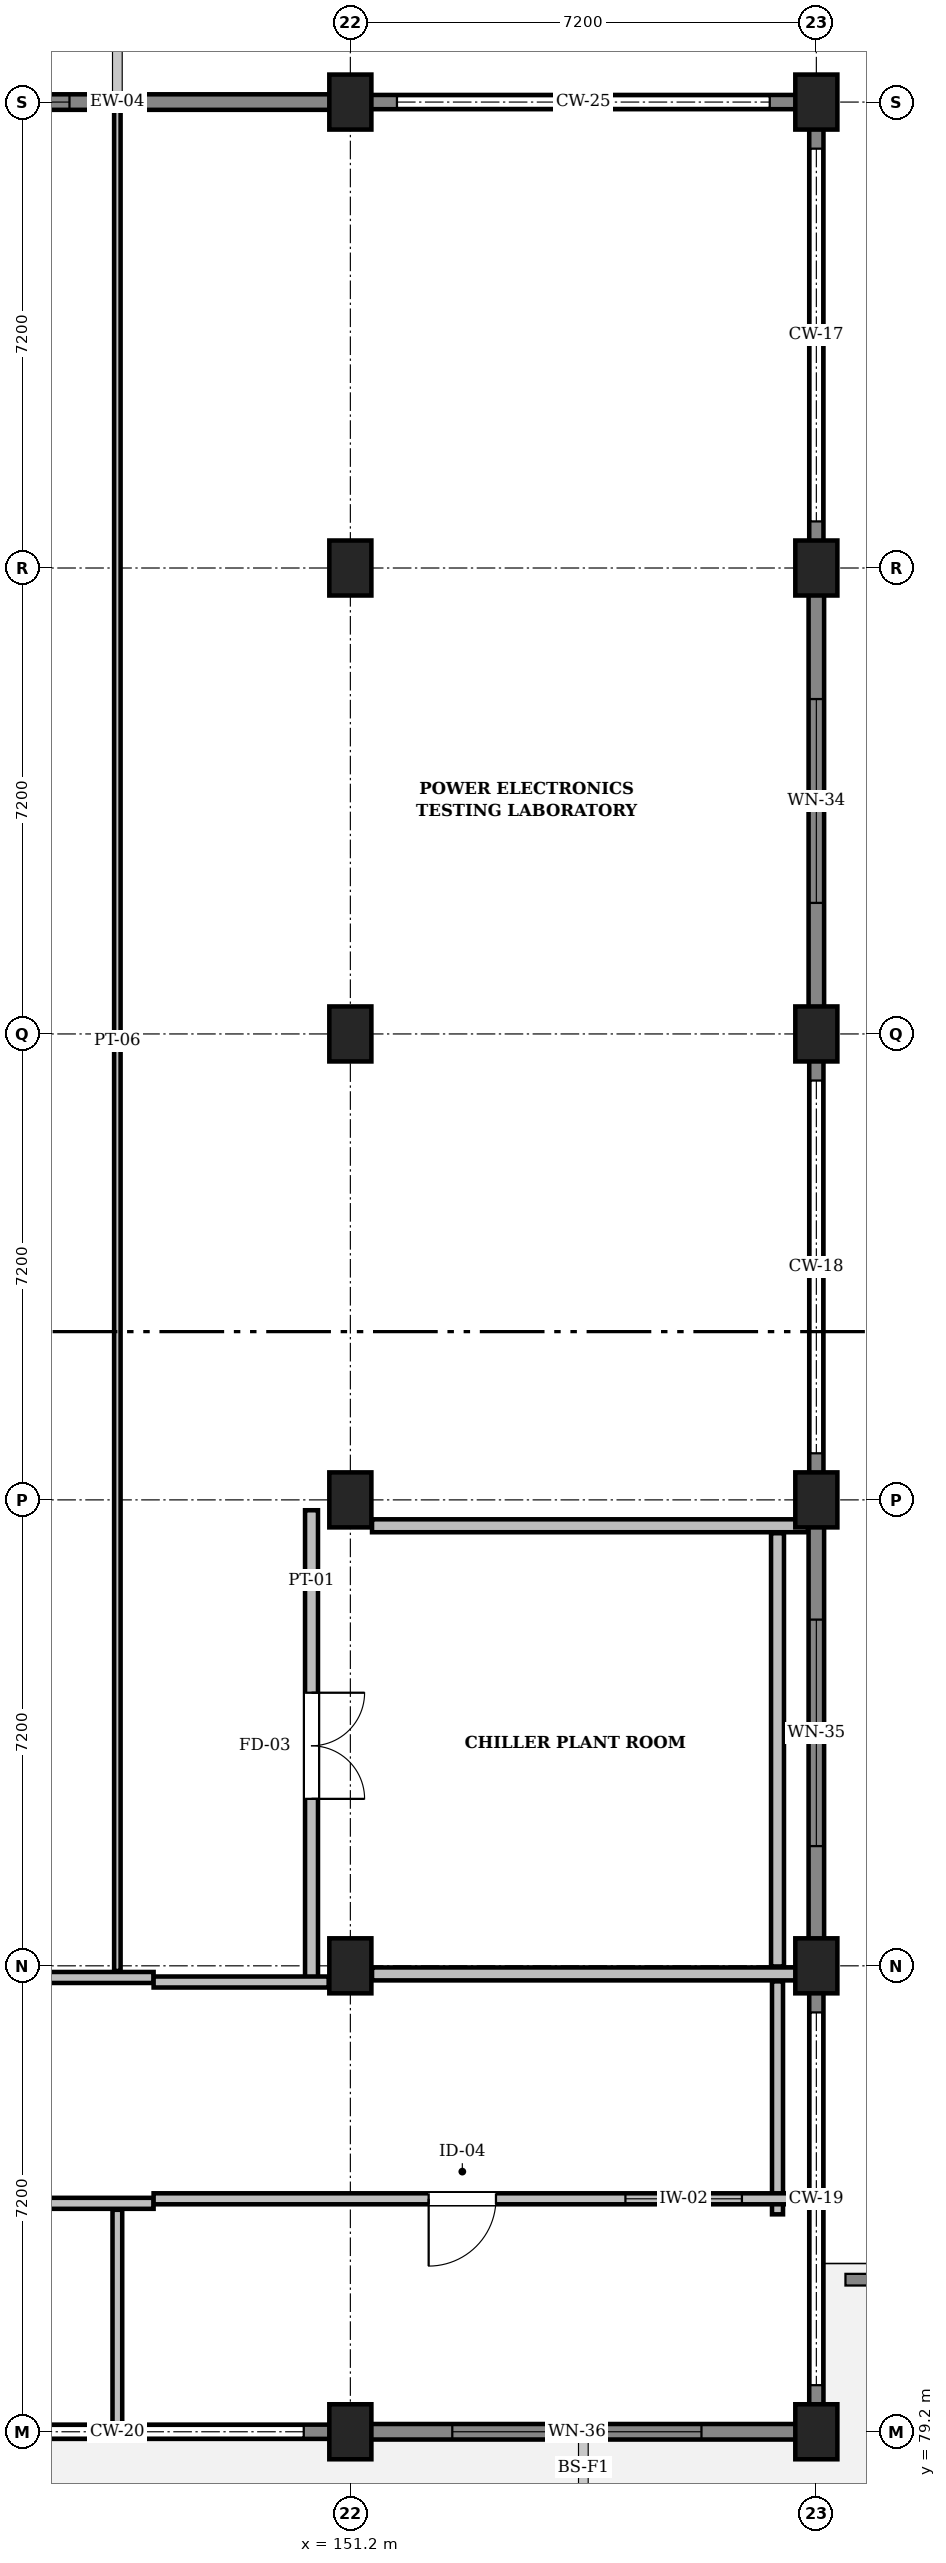
"""IFC4 building model, lengths in metres.
Left out: names, types, materials, properties, quantities, classifications, styles, units other than length and angle.
Written with IfcOpenShell. Run it as: python <this file> out.ifc"""

import sys

from ifc_helpers import new_model, si_unit, direction, frame, frame_2d, origin, origin_2d, place, context, subcontext, project, spatial, rectangle, extrude, element, fill, save


model = new_model("IFC4")
c1 = context("Model", 3, precision=1e-05, world=origin(), true_north=direction((0.0, 1.0)))
c2 = subcontext(c1, "Body", "Model", "MODEL_VIEW")
j1 = project(units=[si_unit("LENGTHUNIT", "METRE"), si_unit("PLANEANGLEUNIT", "RADIAN")], contexts=[c1])
p1 = place(None, origin())
s1 = spatial("IfcSite", under=j1, at=p1, CompositionType="ELEMENT")
p2 = place(p1, origin())
s2 = spatial("IfcBuilding", under=s1, at=p2, CompositionType="ELEMENT")
p3 = place(p2, frame((0.0, 0.0, 9.6)))
s3 = spatial("IfcBuildingStorey", under=s2, at=p3, CompositionType="ELEMENT", Elevation=9.6)
for number, where, z_axis, x_axis in (
    (1, (151.2, 79.2, 0.0), (0.0, 0.0, 1.0), (1.0, 0.0, 0.0)),
    (2, (151.2, 86.4, 0.0), (0.0, 0.0, 1.0), (1.0, 0.0, 0.0)),
    (3, (151.2, 93.6, 0.0), (0.0, 0.0, 1.0), (1.0, 0.0, 0.0)),
    (4, (151.2, 100.8, 0.0), (0.0, 0.0, 1.0), (1.0, 0.0, 0.0)),
    (5, (151.2, 108.0, 0.0), (0.0, 0.0, 1.0), (1.0, 0.0, 0.0)),
    (6, (151.2, 115.2, 0.0), (0.0, 0.0, 1.0), (1.0, 0.0, 0.0)),
    (7, (158.4, 79.2, 0.0), (0.0, 0.0, 1.0), (1.0, 0.0, 0.0)),
    (8, (158.4, 86.4, 0.0), (0.0, 0.0, 1.0), (1.0, 0.0, 0.0)),
    (9, (158.4, 93.6, 0.0), (0.0, 0.0, 1.0), (1.0, 0.0, 0.0)),
    (10, (158.4, 100.8, 0.0), (0.0, 0.0, 1.0), (1.0, 0.0, 0.0)),
    (11, (158.4, 108.0, 0.0), (0.0, 0.0, 1.0), (1.0, 0.0, 0.0)),
    (12, (158.4, 115.2, 0.0), (0.0, 0.0, 1.0), (1.0, 0.0, 0.0)),
):
    element("IfcColumn", number, at=place(p3, frame(where, z_axis=z_axis, x_axis=x_axis)), inside=s3, PredefinedType="COLUMN", context=c2, shape_type="SweptSolid", body=[
        extrude(rectangle(XDim=0.65, YDim=0.85, at=origin_2d()), origin(), (0.0, 0.0, 1.0), 4.8),
    ])
p4 = place(p3, frame((158.4, 115.048, 0.0), z_axis=(0.0, 0.0, 1.0), x_axis=(0.0, -1.0, 0.0)))
e13 = element("IfcWall", 13, at=p4, inside=s3, PredefinedType="SOLIDWALL", context=c2, shape_type="SweptSolid", body=[
    extrude(rectangle(XDim=7.048, YDim=0.22, at=frame_2d((3.524, 0.0))), origin(), (0.0, 0.0, 1.0), 1.24),
])
p5 = place(p3, frame((158.4, 108.0, 0.0), z_axis=(0.0, 0.0, 1.0), x_axis=(0.0, -1.0, 0.0)))
e14 = element("IfcWall", 14, at=p5, inside=s3, PredefinedType="SOLIDWALL", context=c2, shape_type="SweptSolid", body=[
    extrude(rectangle(XDim=7.2, YDim=0.24, at=frame_2d((3.6, 0.0))), origin(), (0.0, 0.0, 1.0), 4.52),
])
p6 = place(p5, frame((2.025, 0.0, 0.95)))
e15 = element("IfcOpeningElement", 15, at=p6, cuts=e14, PredefinedType="OPENING", context=c2, shape_type="SweptSolid", body=[
    extrude(rectangle(XDim=3.15, YDim=1.8, at=frame_2d((1.575, 0.9))), frame((0.0, 0.132, 0.0), z_axis=(0.0, -1.0, 0.0), x_axis=(1.0, 0.0, 0.0)), (0.0, 0.0, 1.0), 0.264),
])
p7 = place(p3, frame((158.4, 100.8, 0.0), z_axis=(0.0, 0.0, 1.0), x_axis=(0.0, -1.0, 0.0)))
e16 = element("IfcWall", 16, at=p7, inside=s3, PredefinedType="SOLIDWALL", context=c2, shape_type="SweptSolid", body=[
    extrude(rectangle(XDim=7.2, YDim=0.22, at=frame_2d((3.6, 0.0))), origin(), (0.0, 0.0, 1.0), 1.24),
])
p8 = place(p3, frame((158.4, 93.6, 0.0), z_axis=(0.0, 0.0, 1.0), x_axis=(0.0, -1.0, 0.0)))
e17 = element("IfcWall", 17, at=p8, inside=s3, PredefinedType="SOLIDWALL", context=c2, shape_type="SweptSolid", body=[
    extrude(rectangle(XDim=7.2, YDim=0.24, at=frame_2d((3.6, 0.0))), origin(), (0.0, 0.0, 1.0), 4.52),
])
p9 = place(p8, frame((1.85, 0.0, 0.95)))
e18 = element("IfcOpeningElement", 18, at=p9, cuts=e17, PredefinedType="OPENING", context=c2, shape_type="SweptSolid", body=[
    extrude(rectangle(XDim=3.5, YDim=1.8, at=frame_2d((1.75, 0.9))), frame((0.0, 0.132, 0.0), z_axis=(0.0, -1.0, 0.0), x_axis=(1.0, 0.0, 0.0)), (0.0, 0.0, 1.0), 0.264),
])
p10 = place(p3, frame((158.4, 86.4, 0.0), z_axis=(0.0, 0.0, 1.0), x_axis=(0.0, -1.0, 0.0)))
e19 = element("IfcWall", 19, at=p10, inside=s3, PredefinedType="SOLIDWALL", context=c2, shape_type="SweptSolid", body=[
    extrude(rectangle(XDim=7.048, YDim=0.22, at=frame_2d((3.524, 0.0))), origin(), (0.0, 0.0, 1.0), 1.24),
])
p11 = place(p3, frame((158.55, 79.2, 0.0), z_axis=(0.0, 0.0, 1.0), x_axis=(-1.0, 0.0, 0.0)))
e20 = element("IfcWall", 20, at=p11, inside=s3, PredefinedType="SOLIDWALL", context=c2, shape_type="SweptSolid", body=[
    extrude(rectangle(XDim=7.35, YDim=0.24, at=frame_2d((3.675, 0.0))), origin(), (0.0, 0.0, 1.0), 4.52),
])
p12 = place(p11, frame((1.925, 0.0, 0.95)))
e21 = element("IfcOpeningElement", 21, at=p12, cuts=e20, PredefinedType="OPENING", context=c2, shape_type="SweptSolid", body=[
    extrude(rectangle(XDim=3.85, YDim=1.8, at=frame_2d((1.925, 0.9))), frame((0.0, 0.132, 0.0), z_axis=(0.0, -1.0, 0.0), x_axis=(1.0, 0.0, 0.0)), (0.0, 0.0, 1.0), 0.264),
])
p13 = place(p3, frame((151.2, 79.2, 0.0), z_axis=(0.0, 0.0, 1.0), x_axis=(-1.0, 0.0, 0.0)))
e22 = element("IfcWall", 22, at=p13, inside=s3, PredefinedType="SOLIDWALL", context=c2, shape_type="SweptSolid", body=[
    extrude(rectangle(XDim=7.2, YDim=0.22, at=frame_2d((3.6, 0.0))), origin(), (0.0, 0.0, 1.0), 1.24),
])
p14 = place(p3, frame((144.0, 115.2, 0.0), z_axis=(0.0, 0.0, 1.0), x_axis=(1.0, 0.0, 0.0)))
e23 = element("IfcWall", 23, at=p14, inside=s3, PredefinedType="SOLIDWALL", context=c2, shape_type="SweptSolid", body=[
    extrude(rectangle(XDim=7.2, YDim=0.24, at=frame_2d((3.6, 0.0))), origin(), (0.0, 0.0, 1.0), 4.52),
])
p15 = place(p14, frame((0.76, 0.0, 0.95)))
e24 = element("IfcOpeningElement", 24, at=p15, cuts=e23, PredefinedType="OPENING", context=c2, shape_type="SweptSolid", body=[
    extrude(rectangle(XDim=2.1, YDim=1.3, at=frame_2d((1.05, 0.65))), frame((0.0, 0.132, 0.0), z_axis=(0.0, -1.0, 0.0), x_axis=(1.0, 0.0, 0.0)), (0.0, 0.0, 1.0), 0.264),
])
p16 = place(p3, frame((151.2, 115.2, 0.0), z_axis=(0.0, 0.0, 1.0), x_axis=(1.0, 0.0, 0.0)))
e25 = element("IfcWall", 25, at=p16, inside=s3, PredefinedType="SOLIDWALL", context=c2, shape_type="SweptSolid", body=[
    extrude(rectangle(XDim=7.35, YDim=0.22, at=frame_2d((3.675, 0.0))), origin(), (0.0, 0.0, 1.0), 1.24),
])
p17 = place(p3, frame((158.85, 81.55, 0.0), z_axis=(0.0, 0.0, 1.0), x_axis=(1.0, 0.0, 0.0)))
e26 = element("IfcWall", 26, at=p17, inside=s3, PredefinedType="PARAPET", context=c2, shape_type="SweptSolid", body=[
    extrude(rectangle(XDim=6.7, YDim=0.18, at=frame_2d((3.35, 0.0))), origin(), (0.0, 0.0, 1.0), 0.95),
])
p18 = place(p3, frame((151.535, 86.275, 0.0), z_axis=(0.0, 0.0, 1.0), x_axis=(1.0, 0.0, 0.0)))
e27 = element("IfcWall", 27, at=p18, inside=s3, PredefinedType="PARTITIONING", context=c2, shape_type="SweptSolid", body=[
    extrude(rectangle(XDim=6.743, YDim=0.2, at=frame_2d((3.372, 0.0))), origin(), (0.0, 0.0, 1.0), 3.8),
])
p19 = place(p3, frame((151.535, 93.2, 0.0), z_axis=(0.0, 0.0, 1.0), x_axis=(1.0, 0.0, 0.0)))
e28 = element("IfcWall", 28, at=p19, inside=s3, PredefinedType="PARTITIONING", context=c2, shape_type="SweptSolid", body=[
    extrude(rectangle(XDim=6.733, YDim=0.2, at=frame_2d((3.367, 0.0))), origin(), (0.0, 0.0, 1.0), 3.8),
])
p20 = place(p3, frame((157.8, 86.39, 0.0), z_axis=(0.0, 0.0, 1.0), x_axis=(0.0, 1.0, 0.0)))
e29 = element("IfcWall", 29, at=p20, inside=s3, PredefinedType="PARTITIONING", context=c2, shape_type="SweptSolid", body=[
    extrude(rectangle(XDim=6.695, YDim=0.2, at=frame_2d((3.348, 0.0))), origin(), (0.0, 0.0, 1.0), 4.46),
])
p21 = place(p3, frame((150.6, 86.16, 0.0), z_axis=(0.0, 0.0, 1.0), x_axis=(0.0, 1.0, 0.0)))
e30 = element("IfcWall", 30, at=p21, inside=s3, PredefinedType="PARTITIONING", context=c2, shape_type="SweptSolid", body=[
    extrude(rectangle(XDim=7.28, YDim=0.2, at=frame_2d((3.64, 0.0))), origin(), (0.0, 0.0, 1.0), 4.46),
])
p22 = place(p21, frame((2.82, 0.0, 0.0)))
e31 = element("IfcOpeningElement", 31, at=p22, cuts=e30, PredefinedType="OPENING", context=c2, shape_type="SweptSolid", body=[
    extrude(rectangle(XDim=1.64, YDim=2.24, at=frame_2d((0.82, 1.12))), frame((0.0, 0.112, 0.0), z_axis=(0.0, -1.0, 0.0), x_axis=(1.0, 0.0, 0.0)), (0.0, 0.0, 1.0), 0.224),
])
p23 = place(p3, frame((144.335, 86.22, 0.0), z_axis=(0.0, 0.0, 1.0), x_axis=(1.0, 0.0, 0.0)))
e32 = element("IfcWall", 32, at=p23, inside=s3, PredefinedType="PARTITIONING", context=c2, shape_type="SweptSolid", body=[
    extrude(rectangle(XDim=3.825, YDim=0.17, at=frame_2d((1.913, 0.0))), origin(), (0.0, 0.0, 1.0), 3.8),
])
p24 = place(p3, frame((137.36, 82.73, 0.0), z_axis=(0.0, 0.0, 1.0), x_axis=(1.0, 0.0, 0.0)))
e33 = element("IfcWall", 33, at=p24, inside=s3, PredefinedType="PARTITIONING", context=c2, shape_type="SweptSolid", body=[
    extrude(rectangle(XDim=10.8, YDim=0.17, at=frame_2d((5.4, 0.0))), origin(), (0.0, 0.0, 1.0), 4.46),
])
p25 = place(p24, frame((4.32, 0.0, 0.0)))
e34 = element("IfcOpeningElement", 34, at=p25, cuts=e33, PredefinedType="OPENING", context=c2, shape_type="SweptSolid", body=[
    extrude(rectangle(XDim=2.16, YDim=2.35, at=frame_2d((1.08, 1.175))), frame((0.0, 0.097, 0.0), z_axis=(0.0, -1.0, 0.0), x_axis=(1.0, 0.0, 0.0)), (0.0, 0.0, 1.0), 0.194),
])
p26 = place(p3, frame((157.8, 82.56, 0.0), z_axis=(0.0, 0.0, 1.0), x_axis=(0.0, 1.0, 0.0)))
e35 = element("IfcWall", 35, at=p26, inside=s3, PredefinedType="PARTITIONING", context=c2, shape_type="SweptSolid", body=[
    extrude(rectangle(XDim=3.6, YDim=0.17, at=frame_2d((1.8, 0.0))), origin(), (0.0, 0.0, 1.0), 4.46),
])
p27 = place(p3, frame((148.16, 82.8, 0.0), z_axis=(0.0, 0.0, 1.0), x_axis=(1.0, 0.0, 0.0)))
e36 = element("IfcWall", 36, at=p27, inside=s3, PredefinedType="PARTITIONING", context=c2, shape_type="SweptSolid", body=[
    extrude(rectangle(XDim=10.118, YDim=0.17, at=frame_2d((5.059, 0.0))), origin(), (0.0, 0.0, 1.0), 4.46),
])
p28 = place(p27, frame((4.25, 0.0, 0.0)))
e37 = element("IfcOpeningElement", 37, at=p28, cuts=e36, PredefinedType="OPENING", context=c2, shape_type="SweptSolid", body=[
    extrude(rectangle(XDim=1.04, YDim=2.18, at=frame_2d((0.52, 1.09))), frame((0.0, 0.097, 0.0), z_axis=(0.0, -1.0, 0.0), x_axis=(1.0, 0.0, 0.0)), (0.0, 0.0, 1.0), 0.194),
])
p29 = place(p27, frame((7.29, 0.0, 1.05)))
e38 = element("IfcOpeningElement", 38, at=p29, cuts=e36, PredefinedType="OPENING", context=c2, shape_type="SweptSolid", body=[
    extrude(rectangle(XDim=1.8, YDim=1.05, at=frame_2d((0.9, 0.525))), frame((0.0, 0.097, 0.0), z_axis=(0.0, -1.0, 0.0), x_axis=(1.0, 0.0, 0.0)), (0.0, 0.0, 1.0), 0.194),
])
p30 = place(p3, frame((148.16, 86.15, 0.0), z_axis=(0.0, 0.0, 1.0), x_axis=(1.0, 0.0, 0.0)))
e39 = element("IfcWall", 39, at=p30, inside=s3, PredefinedType="PARTITIONING", context=c2, shape_type="SweptSolid", body=[
    extrude(rectangle(XDim=2.705, YDim=0.17, at=frame_2d((1.353, 0.0))), origin(), (0.0, 0.0, 1.0), 3.8),
])
p31 = place(p3, frame((147.6, 86.32, 0.0), z_axis=(0.0, 0.0, 1.0), x_axis=(0.0, 1.0, 0.0)))
e40 = element("IfcWall", 40, at=p31, inside=s3, PredefinedType="PARTITIONING", context=c2, shape_type="SweptSolid", body=[
    extrude(rectangle(XDim=28.748, YDim=0.1, at=frame_2d((14.374, 0.0))), origin(), (0.0, 0.0, 1.0), 4.46),
])
p32 = place(p3, frame((147.6, 79.322, 0.0), z_axis=(0.0, 0.0, 1.0), x_axis=(0.0, 1.0, 0.0)))
e41 = element("IfcWall", 41, at=p32, inside=s3, PredefinedType="PARTITIONING", context=c2, shape_type="SweptSolid", body=[
    extrude(rectangle(XDim=3.308, YDim=0.15, at=frame_2d((1.654, 0.0))), origin(), (0.0, 0.0, 1.0), 4.46),
])
p33 = place(p6, origin())
e42 = element("IfcWindow", 42, at=p33, inside=s3, PartitioningType="SINGLE_PANEL", PredefinedType="WINDOW", context=c2, shape_type="SweptSolid", body=[
    extrude(rectangle(XDim=3.15, YDim=1.8, at=frame_2d((1.575, 0.9))), frame((0.0, 0.03, 0.0), z_axis=(0.0, -1.0, 0.0), x_axis=(1.0, 0.0, 0.0)), (0.0, 0.0, 1.0), 0.06),
])
fill(e15, e42)
p34 = place(p9, origin())
e43 = element("IfcWindow", 43, at=p34, inside=s3, PartitioningType="SINGLE_PANEL", PredefinedType="WINDOW", context=c2, shape_type="SweptSolid", body=[
    extrude(rectangle(XDim=3.5, YDim=1.8, at=frame_2d((1.75, 0.9))), frame((0.0, 0.03, 0.0), z_axis=(0.0, -1.0, 0.0), x_axis=(1.0, 0.0, 0.0)), (0.0, 0.0, 1.0), 0.06),
])
fill(e18, e43)
p35 = place(p12, origin())
e44 = element("IfcWindow", 44, at=p35, inside=s3, PartitioningType="SINGLE_PANEL", PredefinedType="WINDOW", context=c2, shape_type="SweptSolid", body=[
    extrude(rectangle(XDim=3.85, YDim=1.8, at=frame_2d((1.925, 0.9))), frame((0.0, 0.03, 0.0), z_axis=(0.0, -1.0, 0.0), x_axis=(1.0, 0.0, 0.0)), (0.0, 0.0, 1.0), 0.06),
])
fill(e21, e44)
p36 = place(p15, origin())
e45 = element("IfcWindow", 45, at=p36, inside=s3, PartitioningType="SINGLE_PANEL", PredefinedType="WINDOW", context=c2, shape_type="SweptSolid", body=[
    extrude(rectangle(XDim=2.1, YDim=1.3, at=frame_2d((1.05, 0.65))), frame((0.0, 0.03, 0.0), z_axis=(0.0, -1.0, 0.0), x_axis=(1.0, 0.0, 0.0)), (0.0, 0.0, 1.0), 0.06),
])
fill(e24, e45)
p37 = place(p28, frame((1.04, 0.0, 0.0), z_axis=(0.0, 0.0, 1.0), x_axis=(-1.0, 0.0, 0.0)))
e46 = element("IfcDoor", 46, at=p37, inside=s3, OperationType="SINGLE_SWING_RIGHT", PredefinedType="DOOR", context=c2, shape_type="SweptSolid", body=[
    extrude(rectangle(XDim=1.04, YDim=2.18, at=frame_2d((0.52, 1.09))), frame((0.0, 0.025, 0.0), z_axis=(0.0, -1.0, 0.0), x_axis=(1.0, 0.0, 0.0)), (0.0, 0.0, 1.0), 0.05),
])
fill(e37, e46)
p38 = place(p29, origin())
e47 = element("IfcWindow", 47, at=p38, inside=s3, PartitioningType="SINGLE_PANEL", PredefinedType="WINDOW", context=c2, shape_type="SweptSolid", body=[
    extrude(rectangle(XDim=1.8, YDim=1.05, at=frame_2d((0.9, 0.525))), frame((0.0, 0.03, 0.0), z_axis=(0.0, -1.0, 0.0), x_axis=(1.0, 0.0, 0.0)), (0.0, 0.0, 1.0), 0.06),
])
fill(e38, e47)
p39 = place(p22, frame((1.64, 0.0, 0.0), z_axis=(0.0, 0.0, 1.0), x_axis=(-1.0, 0.0, 0.0)))
e48 = element("IfcDoor", 48, at=p39, inside=s3, OperationType="DOUBLE_DOOR_SINGLE_SWING", PredefinedType="DOOR", context=c2, shape_type="SweptSolid", body=[
    extrude(rectangle(XDim=1.64, YDim=2.24, at=frame_2d((0.82, 1.12))), frame((0.0, 0.025, 0.0), z_axis=(0.0, -1.0, 0.0), x_axis=(1.0, 0.0, 0.0)), (0.0, 0.0, 1.0), 0.05),
])
fill(e31, e48)
save(model, sys.argv[1])
